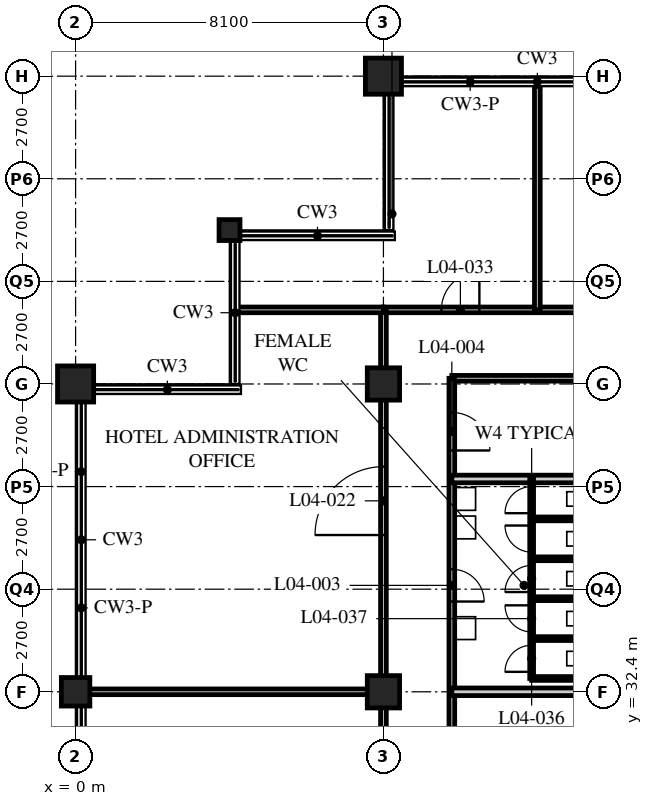
"""IFC4 building model, lengths in metres.
Left out: names, types, materials, properties, quantities, classifications, styles, units other than length and angle.
Written with IfcOpenShell. Run it as: python <this file> out.ifc"""

import sys

from ifc_helpers import new_model, si_unit, direction, frame, frame_2d, origin, origin_2d, place, context, subcontext, project, spatial, rectangle, hollow_rectangle, extrude, element, fill, save


model = new_model("IFC4")
c1 = context("Model", 3, precision=1e-05, world=origin(), true_north=direction((0.0, 1.0)))
c2 = subcontext(c1, "Body", "Model", "MODEL_VIEW")
j1 = project(units=[si_unit("LENGTHUNIT", "METRE"), si_unit("PLANEANGLEUNIT", "RADIAN")], contexts=[c1])
p1 = place(None, origin())
s1 = spatial("IfcSite", under=j1, at=p1, CompositionType="ELEMENT")
p2 = place(p1, origin())
s2 = spatial("IfcBuilding", under=s1, at=p2, CompositionType="ELEMENT")
p3 = place(p2, frame((0.0, 0.0, 22.2)))
s3 = spatial("IfcBuildingStorey", under=s2, at=p3, CompositionType="ELEMENT", Elevation=22.2)
p4 = place(p3, frame((0.0, 32.4, 0.0), z_axis=(0.0, 0.0, 1.0), x_axis=(1.0, 0.0, 0.0)))
e1 = element("IfcColumn", 1, at=p4, inside=s3, PredefinedType="COLUMN", context=c2, shape_type="SweptSolid", body=[
    extrude(hollow_rectangle(XDim=0.75, YDim=0.75, WallThickness=0.07, at=origin_2d()), origin(), (0.0, 0.0, 1.0), 5.4),
])
p5 = place(p3, frame((0.0, 40.5, 0.0), z_axis=(0.0, 0.0, 1.0), x_axis=(1.0, 0.0, 0.0)))
e2 = element("IfcColumn", 2, at=p5, inside=s3, PredefinedType="COLUMN", context=c2, shape_type="SweptSolid", body=[
    extrude(hollow_rectangle(XDim=0.95, YDim=0.95, WallThickness=0.1, at=origin_2d()), origin(), (0.0, 0.0, 1.0), 5.4),
])
p6 = place(p3, frame((4.05, 44.55, 0.0), z_axis=(0.0, 0.0, 1.0), x_axis=(1.0, 0.0, 0.0)))
e3 = element("IfcColumn", 3, at=p6, inside=s3, PredefinedType="COLUMN", context=c2, shape_type="SweptSolid", body=[
    extrude(hollow_rectangle(XDim=0.55, YDim=0.55, WallThickness=0.05, at=origin_2d()), origin(), (0.0, 0.0, 1.0), 5.4),
])
for number, where, z_axis, x_axis in (
    (4, (8.1, 32.4, 0.0), (0.0, 0.0, 1.0), (1.0, 0.0, 0.0)),
    (5, (8.1, 40.5, 0.0), (0.0, 0.0, 1.0), (1.0, 0.0, 0.0)),
):
    element("IfcColumn", number, at=place(p3, frame(where, z_axis=z_axis, x_axis=x_axis)), inside=s3, PredefinedType="COLUMN", context=c2, shape_type="SweptSolid", body=[
        extrude(hollow_rectangle(XDim=0.85, YDim=0.85, WallThickness=0.085, at=origin_2d()), origin(), (0.0, 0.0, 1.0), 5.4),
    ])
p7 = place(p3, frame((8.1, 48.6, 0.0), z_axis=(0.0, 0.0, 1.0), x_axis=(1.0, 0.0, 0.0)))
e6 = element("IfcColumn", 6, at=p7, inside=s3, PredefinedType="COLUMN", context=c2, shape_type="SweptSolid", body=[
    extrude(hollow_rectangle(XDim=0.95, YDim=0.95, WallThickness=0.1, at=origin_2d()), origin(), (0.0, 0.0, 1.0), 5.4),
])
p8 = place(p3, frame((8.1, 42.45, 0.0), z_axis=(0.0, 0.0, 1.0), x_axis=(1.0, 0.0, 0.0)))
e7 = element("IfcWall", 7, at=p8, inside=s3, PredefinedType="PARTITIONING", context=c2, shape_type="SweptSolid", body=[
    extrude(rectangle(XDim=40.5, YDim=0.15, at=frame_2d((20.25, 0.0))), origin(), (0.0, 0.0, 1.0), 5.19),
])
p9 = place(p8, frame((8.2, 0.0, 0.0)))
e8 = element("IfcOpeningElement", 8, at=p9, cuts=e7, PredefinedType="OPENING", context=c2, shape_type="SweptSolid", body=[
    extrude(rectangle(XDim=1.8, YDim=2.4, at=frame_2d((0.9, 1.2))), frame((0.0, 0.085, 0.0), z_axis=(0.0, -1.0, 0.0), x_axis=(1.0, 0.0, 0.0)), (0.0, 0.0, 1.0), 0.17),
])
p10 = place(p8, frame((16.3, 0.0, 0.0)))
e9 = element("IfcOpeningElement", 9, at=p10, cuts=e7, PredefinedType="OPENING", context=c2, shape_type="SweptSolid", body=[
    extrude(rectangle(XDim=1.8, YDim=2.4, at=frame_2d((0.9, 1.2))), frame((0.0, 0.085, 0.0), z_axis=(0.0, -1.0, 0.0), x_axis=(1.0, 0.0, 0.0)), (0.0, 0.0, 1.0), 0.17),
])
p11 = place(p8, frame((24.4, 0.0, 0.0)))
e10 = element("IfcOpeningElement", 10, at=p11, cuts=e7, PredefinedType="OPENING", context=c2, shape_type="SweptSolid", body=[
    extrude(rectangle(XDim=1.8, YDim=2.4, at=frame_2d((0.9, 1.2))), frame((0.0, 0.085, 0.0), z_axis=(0.0, -1.0, 0.0), x_axis=(1.0, 0.0, 0.0)), (0.0, 0.0, 1.0), 0.17),
])
p12 = place(p8, frame((32.5, 0.0, 0.0)))
e11 = element("IfcOpeningElement", 11, at=p12, cuts=e7, PredefinedType="OPENING", context=c2, shape_type="SweptSolid", body=[
    extrude(rectangle(XDim=1.8, YDim=2.4, at=frame_2d((0.9, 1.2))), frame((0.0, 0.085, 0.0), z_axis=(0.0, -1.0, 0.0), x_axis=(1.0, 0.0, 0.0)), (0.0, 0.0, 1.0), 0.17),
])
p13 = place(p8, frame((37.975, 0.0, 0.0)))
e12 = element("IfcOpeningElement", 12, at=p13, cuts=e7, PredefinedType="OPENING", context=c2, shape_type="SweptSolid", body=[
    extrude(rectangle(XDim=1.0, YDim=2.1, at=frame_2d((0.5, 1.05))), frame((0.0, 0.085, 0.0), z_axis=(0.0, -1.0, 0.0), x_axis=(1.0, 0.0, 0.0)), (0.0, 0.0, 1.0), 0.17),
])
p14 = place(p8, frame((1.525, 0.0, 0.0)))
e13 = element("IfcOpeningElement", 13, at=p14, cuts=e7, PredefinedType="OPENING", context=c2, shape_type="SweptSolid", body=[
    extrude(rectangle(XDim=1.0, YDim=2.1, at=frame_2d((0.5, 1.05))), frame((0.0, 0.085, 0.0), z_axis=(0.0, -1.0, 0.0), x_axis=(1.0, 0.0, 0.0)), (0.0, 0.0, 1.0), 0.17),
])
p15 = place(p3, frame((8.1, 8.1, 0.0), z_axis=(0.0, 0.0, 1.0), x_axis=(0.0, 1.0, 0.0)))
e14 = element("IfcWall", 14, at=p15, inside=s3, PredefinedType="PARTITIONING", context=c2, shape_type="SweptSolid", body=[
    extrude(rectangle(XDim=34.35, YDim=0.15, at=frame_2d((17.175, 0.0))), origin(), (0.0, 0.0, 1.0), 4.428),
])
p16 = place(p15, frame((3.15, 0.0, 0.0)))
e15 = element("IfcOpeningElement", 15, at=p16, cuts=e14, PredefinedType="OPENING", context=c2, shape_type="SweptSolid", body=[
    extrude(rectangle(XDim=1.8, YDim=2.4, at=frame_2d((0.9, 1.2))), frame((0.0, 0.085, 0.0), z_axis=(0.0, -1.0, 0.0), x_axis=(1.0, 0.0, 0.0)), (0.0, 0.0, 1.0), 0.17),
])
p17 = place(p15, frame((11.25, 0.0, 0.0)))
e16 = element("IfcOpeningElement", 16, at=p17, cuts=e14, PredefinedType="OPENING", context=c2, shape_type="SweptSolid", body=[
    extrude(rectangle(XDim=1.8, YDim=2.4, at=frame_2d((0.9, 1.2))), frame((0.0, 0.085, 0.0), z_axis=(0.0, -1.0, 0.0), x_axis=(1.0, 0.0, 0.0)), (0.0, 0.0, 1.0), 0.17),
])
p18 = place(p15, frame((19.35, 0.0, 0.0)))
e17 = element("IfcOpeningElement", 17, at=p18, cuts=e14, PredefinedType="OPENING", context=c2, shape_type="SweptSolid", body=[
    extrude(rectangle(XDim=1.8, YDim=2.4, at=frame_2d((0.9, 1.2))), frame((0.0, 0.085, 0.0), z_axis=(0.0, -1.0, 0.0), x_axis=(1.0, 0.0, 0.0)), (0.0, 0.0, 1.0), 0.17),
])
p19 = place(p15, frame((28.425, 0.0, 0.0)))
e18 = element("IfcOpeningElement", 18, at=p19, cuts=e14, PredefinedType="OPENING", context=c2, shape_type="SweptSolid", body=[
    extrude(rectangle(XDim=1.8, YDim=2.4, at=frame_2d((0.9, 1.2))), frame((0.0, 0.085, 0.0), z_axis=(0.0, -1.0, 0.0), x_axis=(1.0, 0.0, 0.0)), (0.0, 0.0, 1.0), 0.17),
])
p20 = place(p3, frame((16.068, 40.65, 0.0), z_axis=(0.0, 0.0, 1.0), x_axis=(-1.0, 0.0, 0.0)))
e19 = element("IfcWall", 19, at=p20, inside=s3, PredefinedType="PARTITIONING", context=c2, shape_type="SweptSolid", body=[
    extrude(rectangle(XDim=6.168, YDim=0.15, at=frame_2d((3.084, 0.0))), origin(), (0.0, 0.0, 1.0), 4.428),
])
p21 = place(p3, frame((9.9, 40.65, 0.0), z_axis=(0.0, 0.0, 1.0), x_axis=(0.0, -1.0, 0.0)))
e20 = element("IfcWall", 20, at=p21, inside=s3, PredefinedType="PARTITIONING", context=c2, shape_type="SweptSolid", body=[
    extrude(rectangle(XDim=30.75, YDim=0.15, at=frame_2d((15.375, 0.0))), origin(), (0.0, 0.0, 1.0), 5.19),
])
p22 = place(p21, frame((13.525, 0.0, 0.0)))
e21 = element("IfcOpeningElement", 21, at=p22, cuts=e20, PredefinedType="OPENING", context=c2, shape_type="SweptSolid", body=[
    extrude(rectangle(XDim=0.85, YDim=2.1, at=frame_2d((0.425, 1.05))), frame((0.0, 0.085, 0.0), z_axis=(0.0, -1.0, 0.0), x_axis=(1.0, 0.0, 0.0)), (0.0, 0.0, 1.0), 0.17),
])
p23 = place(p21, frame((9.4, 0.0, 0.0)))
e22 = element("IfcOpeningElement", 22, at=p23, cuts=e20, PredefinedType="OPENING", context=c2, shape_type="SweptSolid", body=[
    extrude(rectangle(XDim=1.0, YDim=2.1, at=frame_2d((0.5, 1.05))), frame((0.0, 0.085, 0.0), z_axis=(0.0, -1.0, 0.0), x_axis=(1.0, 0.0, 0.0)), (0.0, 0.0, 1.0), 0.17),
])
p24 = place(p21, frame((5.025, 0.0, 0.0)))
e23 = element("IfcOpeningElement", 23, at=p24, cuts=e20, PredefinedType="OPENING", context=c2, shape_type="SweptSolid", body=[
    extrude(rectangle(XDim=0.85, YDim=2.1, at=frame_2d((0.425, 1.05))), frame((0.0, 0.085, 0.0), z_axis=(0.0, -1.0, 0.0), x_axis=(1.0, 0.0, 0.0)), (0.0, 0.0, 1.0), 0.17),
])
p25 = place(p21, frame((0.9, 0.0, 0.0)))
e24 = element("IfcOpeningElement", 24, at=p25, cuts=e20, PredefinedType="OPENING", context=c2, shape_type="SweptSolid", body=[
    extrude(rectangle(XDim=1.0, YDim=2.1, at=frame_2d((0.5, 1.05))), frame((0.0, 0.085, 0.0), z_axis=(0.0, -1.0, 0.0), x_axis=(1.0, 0.0, 0.0)), (0.0, 0.0, 1.0), 0.17),
])
p26 = place(p3, frame((9.9, 32.4, 0.0), z_axis=(0.0, 0.0, 1.0), x_axis=(1.0, 0.0, 0.0)))
e25 = element("IfcWall", 25, at=p26, inside=s3, PredefinedType="SOLIDWALL", context=c2, shape_type="SweptSolid", body=[
    extrude(rectangle(XDim=6.3, YDim=0.2, at=frame_2d((3.15, 0.0))), origin(), (0.0, 0.0, 1.0), 4.428),
])
p27 = place(p3, frame((9.9, 38.0, 0.0), z_axis=(0.0, 0.0, 1.0), x_axis=(1.0, 0.0, 0.0)))
e26 = element("IfcWall", 26, at=p27, inside=s3, PredefinedType="SOLIDWALL", context=c2, shape_type="SweptSolid", body=[
    extrude(rectangle(XDim=3.8, YDim=0.2, at=frame_2d((1.9, 0.0))), origin(), (0.0, 0.0, 1.0), 5.19),
])
p28 = place(p3, frame((8.1, 32.4, 0.0), z_axis=(0.0, 0.0, 1.0), x_axis=(-1.0, 0.0, 0.0)))
e27 = element("IfcWall", 27, at=p28, inside=s3, PredefinedType="PARTITIONING", context=c2, shape_type="SweptSolid", body=[
    extrude(rectangle(XDim=7.8, YDim=0.15, at=frame_2d((3.9, 0.0))), origin(), (0.0, 0.0, 1.0), 4.428),
])
p29 = place(p3, frame((4.22, 42.45, 0.0), z_axis=(0.0, 0.0, 1.0), x_axis=(1.0, 0.0, 0.0)))
e28 = element("IfcWall", 28, at=p29, inside=s3, PredefinedType="PARTITIONING", context=c2, shape_type="SweptSolid", body=[
    extrude(rectangle(XDim=3.88, YDim=0.15, at=frame_2d((1.94, 0.0))), origin(), (0.0, 0.0, 1.0), 5.19),
])
p30 = place(p3, frame((12.15, 42.45, 0.0), z_axis=(0.0, 0.0, 1.0), x_axis=(0.0, 1.0, 0.0)))
e29 = element("IfcWall", 29, at=p30, inside=s3, PredefinedType="PARTITIONING", context=c2, shape_type="SweptSolid", body=[
    extrude(rectangle(XDim=5.885, YDim=0.15, at=frame_2d((2.942, 0.0))), origin(), (0.0, 0.0, 1.0), 5.19),
])
p31 = place(p3, frame((12.0, 32.75, 0.0), z_axis=(0.0, 0.0, 1.0), x_axis=(0.0, 1.0, 0.0)))
e30 = element("IfcWall", 30, at=p31, inside=s3, PredefinedType="PARTITIONING", context=c2, shape_type="SweptSolid", body=[
    extrude(rectangle(XDim=5.25, YDim=0.1, at=frame_2d((2.625, 0.0))), origin(), (0.0, 0.0, 1.0), 5.19),
])
p32 = place(p31, frame((0.175, 0.0, 0.0)))
e31 = element("IfcOpeningElement", 31, at=p32, cuts=e30, PredefinedType="OPENING", context=c2, shape_type="SweptSolid", body=[
    extrude(rectangle(XDim=0.7, YDim=2.0, at=frame_2d((0.35, 1.0))), frame((0.0, 0.06, 0.0), z_axis=(0.0, -1.0, 0.0), x_axis=(1.0, 0.0, 0.0)), (0.0, 0.0, 1.0), 0.12),
])
p33 = place(p31, frame((1.225, 0.0, 0.0)))
e32 = element("IfcOpeningElement", 32, at=p33, cuts=e30, PredefinedType="OPENING", context=c2, shape_type="SweptSolid", body=[
    extrude(rectangle(XDim=0.7, YDim=2.0, at=frame_2d((0.35, 1.0))), frame((0.0, 0.06, 0.0), z_axis=(0.0, -1.0, 0.0), x_axis=(1.0, 0.0, 0.0)), (0.0, 0.0, 1.0), 0.12),
])
p34 = place(p31, frame((2.275, 0.0, 0.0)))
e33 = element("IfcOpeningElement", 33, at=p34, cuts=e30, PredefinedType="OPENING", context=c2, shape_type="SweptSolid", body=[
    extrude(rectangle(XDim=0.7, YDim=2.0, at=frame_2d((0.35, 1.0))), frame((0.0, 0.06, 0.0), z_axis=(0.0, -1.0, 0.0), x_axis=(1.0, 0.0, 0.0)), (0.0, 0.0, 1.0), 0.12),
])
p35 = place(p31, frame((3.325, 0.0, 0.0)))
e34 = element("IfcOpeningElement", 34, at=p35, cuts=e30, PredefinedType="OPENING", context=c2, shape_type="SweptSolid", body=[
    extrude(rectangle(XDim=0.7, YDim=2.0, at=frame_2d((0.35, 1.0))), frame((0.0, 0.06, 0.0), z_axis=(0.0, -1.0, 0.0), x_axis=(1.0, 0.0, 0.0)), (0.0, 0.0, 1.0), 0.12),
])
p36 = place(p31, frame((4.35, 0.0, 0.0)))
e35 = element("IfcOpeningElement", 35, at=p36, cuts=e30, PredefinedType="OPENING", context=c2, shape_type="SweptSolid", body=[
    extrude(rectangle(XDim=0.7, YDim=2.0, at=frame_2d((0.35, 1.0))), frame((0.0, 0.06, 0.0), z_axis=(0.0, -1.0, 0.0), x_axis=(1.0, 0.0, 0.0)), (0.0, 0.0, 1.0), 0.12),
])
for number, where, z_axis, x_axis in (
    (36, (12.0, 32.75, 0.0), (0.0, 0.0, 1.0), (1.0, 0.0, 0.0)),
    (37, (12.0, 33.8, 0.0), (0.0, 0.0, 1.0), (1.0, 0.0, 0.0)),
    (38, (12.0, 34.85, 0.0), (0.0, 0.0, 1.0), (1.0, 0.0, 0.0)),
    (39, (12.0, 35.9, 0.0), (0.0, 0.0, 1.0), (1.0, 0.0, 0.0)),
    (40, (12.0, 36.95, 0.0), (0.0, 0.0, 1.0), (1.0, 0.0, 0.0)),
):
    element("IfcWall", number, at=place(p3, frame(where, z_axis=z_axis, x_axis=x_axis)), inside=s3, PredefinedType="PARTITIONING", context=c2, shape_type="SweptSolid", body=[
        extrude(rectangle(XDim=1.7, YDim=0.1, at=frame_2d((0.85, 0.0))), origin(), (0.0, 0.0, 1.0), 5.19),
    ])
p37 = place(p24, origin())
e41 = element("IfcDoor", 41, at=p37, inside=s3, OperationType="SINGLE_SWING_RIGHT", PredefinedType="DOOR", context=c2, shape_type="SweptSolid", body=[
    extrude(rectangle(XDim=0.85, YDim=2.1, at=frame_2d((0.425, 1.05))), frame((0.0, 0.025, 0.0), z_axis=(0.0, -1.0, 0.0), x_axis=(1.0, 0.0, 0.0)), (0.0, 0.0, 1.0), 0.05),
])
fill(e23, e41)
p38 = place(p25, origin())
e42 = element("IfcDoor", 42, at=p38, inside=s3, OperationType="SINGLE_SWING_RIGHT", PredefinedType="DOOR", context=c2, shape_type="SweptSolid", body=[
    extrude(rectangle(XDim=1.0, YDim=2.1, at=frame_2d((0.5, 1.05))), frame((0.0, 0.025, 0.0), z_axis=(0.0, -1.0, 0.0), x_axis=(1.0, 0.0, 0.0)), (0.0, 0.0, 1.0), 0.05),
])
fill(e24, e42)
p39 = place(p19, origin())
e43 = element("IfcDoor", 43, at=p39, inside=s3, OperationType="DOUBLE_DOOR_SINGLE_SWING", PredefinedType="DOOR", context=c2, shape_type="SweptSolid", body=[
    extrude(rectangle(XDim=1.8, YDim=2.4, at=frame_2d((0.9, 1.2))), frame((0.0, 0.025, 0.0), z_axis=(0.0, -1.0, 0.0), x_axis=(1.0, 0.0, 0.0)), (0.0, 0.0, 1.0), 0.05),
])
fill(e18, e43)
p40 = place(p14, origin())
e44 = element("IfcDoor", 44, at=p40, inside=s3, OperationType="SINGLE_SWING_RIGHT", PredefinedType="DOOR", context=c2, shape_type="SweptSolid", body=[
    extrude(rectangle(XDim=1.0, YDim=2.1, at=frame_2d((0.5, 1.05))), frame((0.0, 0.025, 0.0), z_axis=(0.0, -1.0, 0.0), x_axis=(1.0, 0.0, 0.0)), (0.0, 0.0, 1.0), 0.05),
])
fill(e13, e44)
p41 = place(p32, origin())
e45 = element("IfcDoor", 45, at=p41, inside=s3, OperationType="SINGLE_SWING_LEFT", PredefinedType="DOOR", context=c2, shape_type="SweptSolid", body=[
    extrude(rectangle(XDim=0.7, YDim=2.0, at=frame_2d((0.35, 1.0))), frame((0.0, 0.025, 0.0), z_axis=(0.0, -1.0, 0.0), x_axis=(1.0, 0.0, 0.0)), (0.0, 0.0, 1.0), 0.05),
])
fill(e31, e45)
p42 = place(p33, origin())
e46 = element("IfcDoor", 46, at=p42, inside=s3, OperationType="SINGLE_SWING_RIGHT", PredefinedType="DOOR", context=c2, shape_type="SweptSolid", body=[
    extrude(rectangle(XDim=0.7, YDim=2.0, at=frame_2d((0.35, 1.0))), frame((0.0, 0.025, 0.0), z_axis=(0.0, -1.0, 0.0), x_axis=(1.0, 0.0, 0.0)), (0.0, 0.0, 1.0), 0.05),
])
fill(e32, e46)
p43 = place(p34, origin())
e47 = element("IfcDoor", 47, at=p43, inside=s3, OperationType="SINGLE_SWING_LEFT", PredefinedType="DOOR", context=c2, shape_type="SweptSolid", body=[
    extrude(rectangle(XDim=0.7, YDim=2.0, at=frame_2d((0.35, 1.0))), frame((0.0, 0.025, 0.0), z_axis=(0.0, -1.0, 0.0), x_axis=(1.0, 0.0, 0.0)), (0.0, 0.0, 1.0), 0.05),
])
fill(e33, e47)
p44 = place(p35, origin())
e48 = element("IfcDoor", 48, at=p44, inside=s3, OperationType="SINGLE_SWING_RIGHT", PredefinedType="DOOR", context=c2, shape_type="SweptSolid", body=[
    extrude(rectangle(XDim=0.7, YDim=2.0, at=frame_2d((0.35, 1.0))), frame((0.0, 0.025, 0.0), z_axis=(0.0, -1.0, 0.0), x_axis=(1.0, 0.0, 0.0)), (0.0, 0.0, 1.0), 0.05),
])
fill(e34, e48)
p45 = place(p36, origin())
e49 = element("IfcDoor", 49, at=p45, inside=s3, OperationType="SINGLE_SWING_LEFT", PredefinedType="DOOR", context=c2, shape_type="SweptSolid", body=[
    extrude(rectangle(XDim=0.7, YDim=2.0, at=frame_2d((0.35, 1.0))), frame((0.0, 0.025, 0.0), z_axis=(0.0, -1.0, 0.0), x_axis=(1.0, 0.0, 0.0)), (0.0, 0.0, 1.0), 0.05),
])
fill(e35, e49)
save(model, sys.argv[1])
